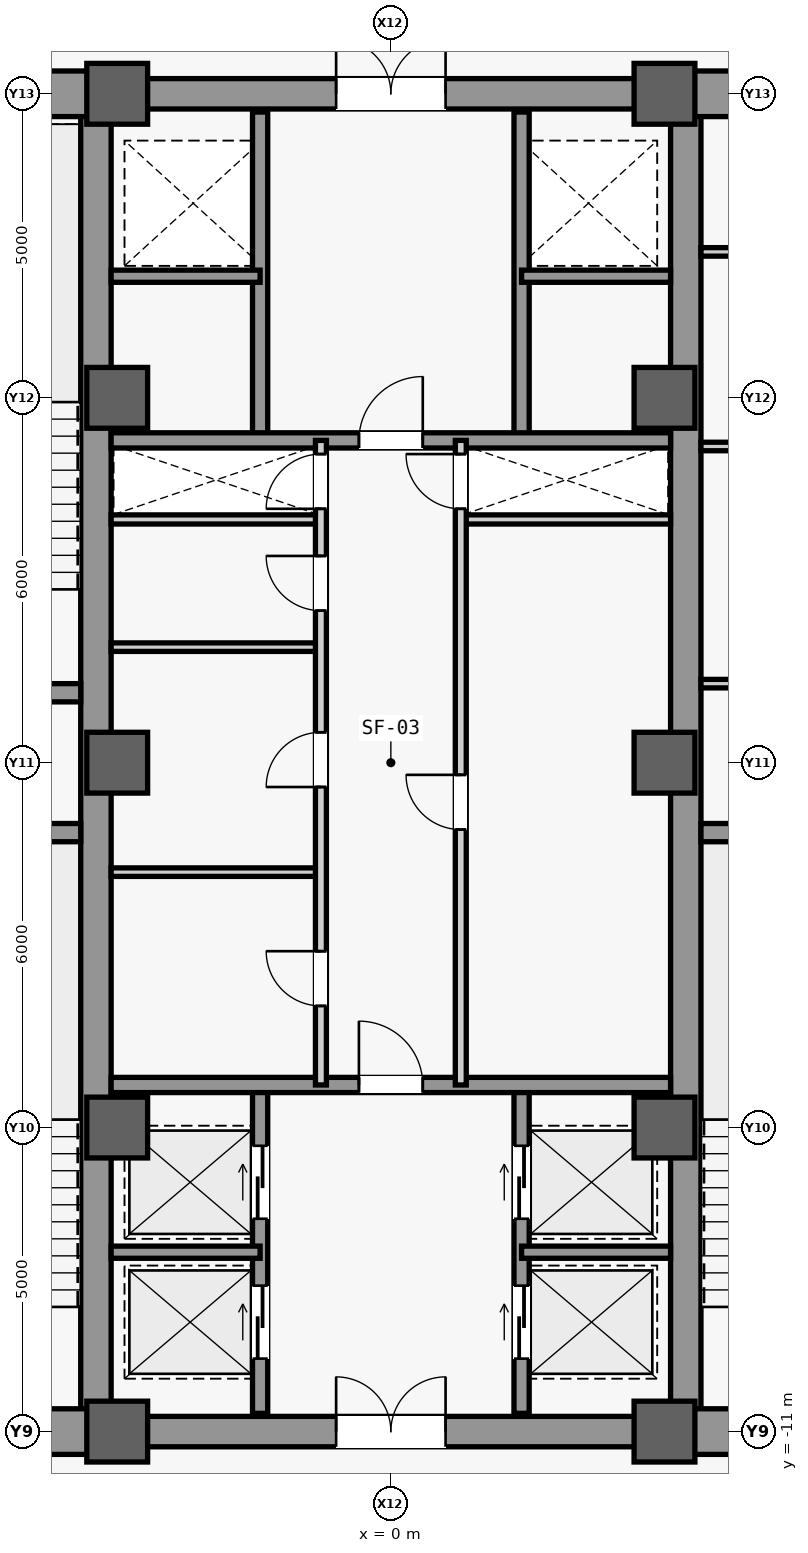
"""IFC4 building model, lengths in metres.
Left out: names, types, materials, properties, quantities, classifications, styles, units other than length and angle.
Written with IfcOpenShell. Run it as: python <this file> out.ifc"""

import sys

from ifc_helpers import new_model, si_unit, direction, frame, frame_2d, origin, origin_2d, place, context, subcontext, project, spatial, rectangle, extrude, source, transform, mapped, element, fill, save


model = new_model("IFC4")
c1 = context("Model", 3, precision=1e-05, world=origin(), true_north=direction((0.0, 1.0)))
c2 = subcontext(c1, "Body", "Model", "MODEL_VIEW")
j1 = project(units=[si_unit("LENGTHUNIT", "METRE"), si_unit("PLANEANGLEUNIT", "RADIAN")], contexts=[c1])
p1 = place(None, origin())
s1 = spatial("IfcSite", under=j1, at=p1, CompositionType="ELEMENT")
p2 = place(p1, origin())
s2 = spatial("IfcBuilding", under=s1, at=p2, CompositionType="ELEMENT")
p3 = place(p2, frame((0.0, 0.0, 128.3)))
s3 = spatial("IfcBuildingStorey", under=s2, at=p3, CompositionType="ELEMENT", Elevation=128.3)
m1 = source(origin(), c2, "Body", "SweptSolid", [
    extrude(rectangle(XDim=21.4, YDim=0.5, at=frame_2d((10.7, 0.0))), origin(), (0.0, 0.0, 1.0), 3.84),
])
for number, where, z_axis, x_axis in (
    (1, (-4.85, -10.7, 0.0), (0.0, 0.0, 1.0), (0.0, 1.0, 0.0)),
    (2, (4.85, -10.7, 0.0), (0.0, 0.0, 1.0), (0.0, 1.0, 0.0)),
):
    element("IfcWall", number, at=place(p3, frame(where, z_axis=z_axis, x_axis=x_axis)), inside=s3, PredefinedType="SHEAR", context=c2, shape_type="MappedRepresentation", body=[
        mapped(m1, transform((0.0, 0.0, 0.0), scale=1.0)),
    ])
m2 = source(origin(), c2, "Body", "SweptSolid", [
    extrude(rectangle(XDim=5.85, YDim=0.75, at=frame_2d((2.925, 0.0))), origin(), (0.0, 0.0, 1.0), 3.84),
])
for number, where, z_axis, x_axis in (
    (3, (-10.7, -11.0, 0.0), (0.0, 0.0, 1.0), (1.0, 0.0, 0.0)),
    (4, (-10.7, 11.0, 0.0), (0.0, 0.0, 1.0), (1.0, 0.0, 0.0)),
    (5, (4.85, -11.0, 0.0), (0.0, 0.0, 1.0), (1.0, 0.0, 0.0)),
):
    element("IfcWall", number, at=place(p3, frame(where, z_axis=z_axis, x_axis=x_axis)), inside=s3, PredefinedType="SHEAR", context=c2, shape_type="MappedRepresentation", body=[
        mapped(m2, transform((0.0, 0.0, 0.0), scale=1.0)),
    ])
p4 = place(p3, frame((4.85, 11.0, 0.0), z_axis=(0.0, 0.0, 1.0), x_axis=(1.0, 0.0, 0.0)))
e6 = element("IfcWall", 6, at=p4, inside=s3, PredefinedType="SHEAR", context=c2, shape_type="MappedRepresentation", body=[
    mapped(m2, transform((0.0, 0.0, 0.0), scale=1.0)),
])
m3 = source(origin(), c2, "Body", "SweptSolid", [
    extrude(rectangle(XDim=1.05, YDim=2.2, at=frame_2d((0.525, 1.1))), frame((0.0, 0.385, 0.0), z_axis=(0.0, -1.0, 0.0), x_axis=(1.0, 0.0, 0.0)), (0.0, 0.0, 1.0), 0.77),
])
p5 = place(p4, frame((1.375, 0.0, 0.0)))
e7 = element("IfcOpeningElement", 7, at=p5, cuts=e6, PredefinedType="OPENING", context=c2, shape_type="MappedRepresentation", body=[
    mapped(m3, transform((0.0, 0.0, 0.0), scale=1.0)),
])
m4 = source(origin(), c2, "Body", "SweptSolid", [
    extrude(rectangle(XDim=5.6, YDim=0.3, at=frame_2d((2.8, 0.0))), origin(), (0.0, 0.0, 1.0), 3.84),
])
for number, where, z_axis, x_axis in (
    (8, (-10.7, -1.15, 0.0), (0.0, 0.0, 1.0), (1.0, 0.0, 0.0)),
    (9, (-10.7, 1.15, 0.0), (0.0, 0.0, 1.0), (1.0, 0.0, 0.0)),
    (10, (5.1, -1.15, 0.0), (0.0, 0.0, 1.0), (1.0, 0.0, 0.0)),
):
    element("IfcWall", number, at=place(p3, frame(where, z_axis=z_axis, x_axis=x_axis)), inside=s3, PredefinedType="SHEAR", context=c2, shape_type="MappedRepresentation", body=[
        mapped(m4, transform((0.0, 0.0, 0.0), scale=1.0)),
    ])
m5 = source(origin(), c2, "Body", "SweptSolid", [
    extrude(rectangle(XDim=9.2, YDim=0.5, at=frame_2d((4.6, 0.0))), origin(), (0.0, 0.0, 1.0), 3.84),
])
p6 = place(p3, frame((-4.6, -11.0, 0.0), z_axis=(0.0, 0.0, 1.0), x_axis=(1.0, 0.0, 0.0)))
e11 = element("IfcWall", 11, at=p6, inside=s3, PredefinedType="SHEAR", context=c2, shape_type="MappedRepresentation", body=[
    mapped(m5, transform((0.0, 0.0, 0.0), scale=1.0)),
])
m6 = source(origin(), c2, "Body", "SweptSolid", [
    extrude(rectangle(XDim=1.8, YDim=2.25, at=frame_2d((0.9, 1.125))), frame((0.0, 0.26, 0.0), z_axis=(0.0, -1.0, 0.0), x_axis=(1.0, 0.0, 0.0)), (0.0, 0.0, 1.0), 0.52),
])
p7 = place(p6, frame((3.7, 0.0, 0.0)))
e12 = element("IfcOpeningElement", 12, at=p7, cuts=e11, PredefinedType="OPENING", context=c2, shape_type="MappedRepresentation", body=[
    mapped(m6, transform((0.0, 0.0, 0.0), scale=1.0)),
])
p8 = place(p3, frame((-4.6, 11.0, 0.0), z_axis=(0.0, 0.0, 1.0), x_axis=(1.0, 0.0, 0.0)))
e13 = element("IfcWall", 13, at=p8, inside=s3, PredefinedType="SHEAR", context=c2, shape_type="MappedRepresentation", body=[
    mapped(m5, transform((0.0, 0.0, 0.0), scale=1.0)),
])
p9 = place(p8, frame((3.7, 0.0, 0.0)))
e14 = element("IfcOpeningElement", 14, at=p9, cuts=e13, PredefinedType="OPENING", context=c2, shape_type="MappedRepresentation", body=[
    mapped(m6, transform((0.0, 0.0, 0.0), scale=1.0)),
])
m7 = source(origin(), c2, "Body", "SweptSolid", [
    extrude(rectangle(XDim=1.0, YDim=1.0, at=origin_2d()), origin(), (0.0, 0.0, 1.0), 4.1),
])
for number, where, z_axis, x_axis in (
    (15, (-4.5, -11.0, 0.0), (0.0, 0.0, 1.0), (1.0, 0.0, 0.0)),
    (16, (-4.5, -6.0, 0.0), (0.0, 0.0, 1.0), (1.0, 0.0, 0.0)),
    (17, (-4.5, 0.0, 0.0), (0.0, 0.0, 1.0), (1.0, 0.0, 0.0)),
    (18, (-4.5, 6.0, 0.0), (0.0, 0.0, 1.0), (1.0, 0.0, 0.0)),
    (19, (-4.5, 11.0, 0.0), (0.0, 0.0, 1.0), (1.0, 0.0, 0.0)),
    (20, (4.5, -11.0, 0.0), (0.0, 0.0, 1.0), (1.0, 0.0, 0.0)),
    (21, (4.5, -6.0, 0.0), (0.0, 0.0, 1.0), (1.0, 0.0, 0.0)),
    (22, (4.5, 0.0, 0.0), (0.0, 0.0, 1.0), (1.0, 0.0, 0.0)),
    (23, (4.5, 6.0, 0.0), (0.0, 0.0, 1.0), (1.0, 0.0, 0.0)),
    (24, (4.5, 11.0, 0.0), (0.0, 0.0, 1.0), (1.0, 0.0, 0.0)),
):
    element("IfcColumn", number, at=place(p3, frame(where, z_axis=z_axis, x_axis=x_axis)), inside=s3, PredefinedType="COLUMN", context=c2, shape_type="MappedRepresentation", body=[
        mapped(m7, transform((0.0, 0.0, 0.0), scale=1.0)),
    ])
m8 = source(origin(), c2, "Body", "SweptSolid", [
    extrude(rectangle(XDim=3.15, YDim=0.14, at=frame_2d((1.575, 0.0))), origin(), (0.0, 0.0, 1.0), 3.84),
])
p10 = place(p3, frame((5.1, 1.3, 0.0), z_axis=(0.0, 0.0, 1.0), x_axis=(1.0, 0.0, 0.0)))
e25 = element("IfcWall", 25, at=p10, inside=s3, PredefinedType="PARTITIONING", context=c2, shape_type="MappedRepresentation", body=[
    mapped(m8, transform((0.0, 0.0, 0.0), scale=1.0)),
])
p11 = place(p3, frame((5.1, 8.4, 0.0), z_axis=(0.0, 0.0, 1.0), x_axis=(1.0, 0.0, 0.0)))
e26 = element("IfcWall", 26, at=p11, inside=s3, PredefinedType="PARTITIONING", context=c2, shape_type="MappedRepresentation", body=[
    mapped(m8, transform((0.0, 0.0, 0.0), scale=1.0)),
])
m9 = source(origin(), c2, "Body", "SweptSolid", [
    extrude(rectangle(XDim=0.9, YDim=2.15, at=frame_2d((0.45, 1.075))), frame((0.0, 0.08, 0.0), z_axis=(0.0, -1.0, 0.0), x_axis=(1.0, 0.0, 0.0)), (0.0, 0.0, 1.0), 0.16),
])
p12 = place(p11, frame((1.13, 0.0, 0.0)))
e27 = element("IfcOpeningElement", 27, at=p12, cuts=e26, PredefinedType="OPENING", context=c2, shape_type="MappedRepresentation", body=[
    mapped(m9, transform((0.0, 0.0, 0.0), scale=1.0)),
])
p13 = place(p3, frame((5.1, 5.2, 0.0), z_axis=(0.0, 0.0, 1.0), x_axis=(1.0, 0.0, 0.0)))
e28 = element("IfcWall", 28, at=p13, inside=s3, PredefinedType="PARTITIONING", context=c2, shape_type="MappedRepresentation", body=[
    mapped(m8, transform((0.0, 0.0, 0.0), scale=1.0)),
])
p14 = place(p13, frame((1.13, 0.0, 0.0)))
e29 = element("IfcOpeningElement", 29, at=p14, cuts=e28, PredefinedType="OPENING", context=c2, shape_type="MappedRepresentation", body=[
    mapped(m9, transform((0.0, 0.0, 0.0), scale=1.0)),
])
m10 = source(origin(), c2, "Body", "SweptSolid", [
    extrude(rectangle(XDim=3.45, YDim=0.15, at=frame_2d((1.725, 0.0))), origin(), (0.0, 0.0, 1.0), 3.84),
])
for number, where, z_axis, x_axis in (
    (30, (-4.6, 4.0, 0.0), (0.0, 0.0, 1.0), (1.0, 0.0, 0.0)),
    (31, (1.15, 4.0, 0.0), (0.0, 0.0, 1.0), (1.0, 0.0, 0.0)),
):
    element("IfcWall", number, at=place(p3, frame(where, z_axis=z_axis, x_axis=x_axis)), inside=s3, PredefinedType="PARTITIONING", context=c2, shape_type="MappedRepresentation", body=[
        mapped(m10, transform((0.0, 0.0, 0.0), scale=1.0)),
    ])
m11 = source(origin(), c2, "Body", "SweptSolid", [
    extrude(rectangle(XDim=5.4, YDim=0.25, at=frame_2d((2.7, 0.0))), origin(), (0.0, 0.0, 1.0), 3.84),
])
p15 = place(p3, frame((-2.15, -10.7, 0.0), z_axis=(0.0, 0.0, 1.0), x_axis=(0.0, 1.0, 0.0)))
e32 = element("IfcWall", 32, at=p15, inside=s3, PredefinedType="SHEAR", context=c2, shape_type="MappedRepresentation", body=[
    mapped(m11, transform((0.0, 0.0, 0.0), scale=1.0)),
])
m12 = source(origin(), c2, "Body", "SweptSolid", [
    extrude(rectangle(XDim=1.2, YDim=2.3, at=frame_2d((0.6, 1.15))), frame((0.0, 0.135, 0.0), z_axis=(0.0, -1.0, 0.0), x_axis=(1.0, 0.0, 0.0)), (0.0, 0.0, 1.0), 0.27),
])
p16 = place(p15, frame((0.9, 0.0, 0.0)))
e33 = element("IfcOpeningElement", 33, at=p16, cuts=e32, PredefinedType="OPENING", context=c2, shape_type="MappedRepresentation", body=[
    mapped(m12, transform((0.0, 0.0, 0.0), scale=1.0)),
])
p17 = place(p15, frame((3.2, 0.0, 0.0)))
e34 = element("IfcOpeningElement", 34, at=p17, cuts=e32, PredefinedType="OPENING", context=c2, shape_type="MappedRepresentation", body=[
    mapped(m12, transform((0.0, 0.0, 0.0), scale=1.0)),
])
p18 = place(p3, frame((2.15, -10.7, 0.0), z_axis=(0.0, 0.0, 1.0), x_axis=(0.0, 1.0, 0.0)))
e35 = element("IfcWall", 35, at=p18, inside=s3, PredefinedType="SHEAR", context=c2, shape_type="MappedRepresentation", body=[
    mapped(m11, transform((0.0, 0.0, 0.0), scale=1.0)),
])
p19 = place(p18, frame((0.9, 0.0, 0.0)))
e36 = element("IfcOpeningElement", 36, at=p19, cuts=e35, PredefinedType="OPENING", context=c2, shape_type="MappedRepresentation", body=[
    mapped(m12, transform((0.0, 0.0, 0.0), scale=1.0)),
])
p20 = place(p18, frame((3.2, 0.0, 0.0)))
e37 = element("IfcOpeningElement", 37, at=p20, cuts=e35, PredefinedType="OPENING", context=c2, shape_type="MappedRepresentation", body=[
    mapped(m12, transform((0.0, 0.0, 0.0), scale=1.0)),
])
m13 = source(origin(), c2, "Body", "SweptSolid", [
    extrude(rectangle(XDim=2.45, YDim=0.2, at=frame_2d((1.225, 0.0))), origin(), (0.0, 0.0, 1.0), 3.84),
])
for number, where, z_axis, x_axis in (
    (38, (-4.6, -8.05, 0.0), (0.0, 0.0, 1.0), (1.0, 0.0, 0.0)),
    (39, (2.15, -8.05, 0.0), (0.0, 0.0, 1.0), (1.0, 0.0, 0.0)),
):
    element("IfcWall", number, at=place(p3, frame(where, z_axis=z_axis, x_axis=x_axis)), inside=s3, PredefinedType="SHEAR", context=c2, shape_type="MappedRepresentation", body=[
        mapped(m13, transform((0.0, 0.0, 0.0), scale=1.0)),
    ])
m14 = source(origin(), c2, "Body", "SweptSolid", [
    extrude(rectangle(XDim=9.2, YDim=0.25, at=frame_2d((4.6, 0.0))), origin(), (0.0, 0.0, 1.0), 3.84),
])
p21 = place(p3, frame((-4.6, -5.3, 0.0), z_axis=(0.0, 0.0, 1.0), x_axis=(1.0, 0.0, 0.0)))
e40 = element("IfcWall", 40, at=p21, inside=s3, PredefinedType="SHEAR", context=c2, shape_type="MappedRepresentation", body=[
    mapped(m14, transform((0.0, 0.0, 0.0), scale=1.0)),
])
m15 = source(origin(), c2, "Body", "SweptSolid", [
    extrude(rectangle(XDim=1.05, YDim=2.2, at=frame_2d((0.525, 1.1))), frame((0.0, 0.135, 0.0), z_axis=(0.0, -1.0, 0.0), x_axis=(1.0, 0.0, 0.0)), (0.0, 0.0, 1.0), 0.27),
])
p22 = place(p21, frame((4.075, 0.0, 0.0)))
e41 = element("IfcOpeningElement", 41, at=p22, cuts=e40, PredefinedType="OPENING", context=c2, shape_type="MappedRepresentation", body=[
    mapped(m15, transform((0.0, 0.0, 0.0), scale=1.0)),
])
for number, where, z_axis, x_axis in (
    (42, (-2.15, 5.3, 0.0), (0.0, 0.0, 1.0), (0.0, 1.0, 0.0)),
    (43, (2.15, 5.3, 0.0), (0.0, 0.0, 1.0), (0.0, 1.0, 0.0)),
):
    element("IfcWall", number, at=place(p3, frame(where, z_axis=z_axis, x_axis=x_axis)), inside=s3, PredefinedType="SHEAR", context=c2, shape_type="MappedRepresentation", body=[
        mapped(m11, transform((0.0, 0.0, 0.0), scale=1.0)),
    ])
for number, where, z_axis, x_axis in (
    (44, (-4.6, 8.0, 0.0), (0.0, 0.0, 1.0), (1.0, 0.0, 0.0)),
    (45, (2.15, 8.0, 0.0), (0.0, 0.0, 1.0), (1.0, 0.0, 0.0)),
):
    element("IfcWall", number, at=place(p3, frame(where, z_axis=z_axis, x_axis=x_axis)), inside=s3, PredefinedType="SHEAR", context=c2, shape_type="MappedRepresentation", body=[
        mapped(m13, transform((0.0, 0.0, 0.0), scale=1.0)),
    ])
p23 = place(p3, frame((-4.6, 5.3, 0.0), z_axis=(0.0, 0.0, 1.0), x_axis=(1.0, 0.0, 0.0)))
e46 = element("IfcWall", 46, at=p23, inside=s3, PredefinedType="SHEAR", context=c2, shape_type="MappedRepresentation", body=[
    mapped(m14, transform((0.0, 0.0, 0.0), scale=1.0)),
])
p24 = place(p23, frame((4.075, 0.0, 0.0)))
e47 = element("IfcOpeningElement", 47, at=p24, cuts=e46, PredefinedType="OPENING", context=c2, shape_type="MappedRepresentation", body=[
    mapped(m15, transform((0.0, 0.0, 0.0), scale=1.0)),
])
m16 = source(origin(), c2, "Body", "SweptSolid", [
    extrude(rectangle(XDim=3.45, YDim=0.14, at=frame_2d((1.725, 0.0))), origin(), (0.0, 0.0, 1.0), 3.84),
])
for number, where, z_axis, x_axis in (
    (48, (-4.6, -1.8, 0.0), (0.0, 0.0, 1.0), (1.0, 0.0, 0.0)),
    (49, (-4.6, 1.9, 0.0), (0.0, 0.0, 1.0), (1.0, 0.0, 0.0)),
):
    element("IfcWall", number, at=place(p3, frame(where, z_axis=z_axis, x_axis=x_axis)), inside=s3, PredefinedType="PARTITIONING", context=c2, shape_type="MappedRepresentation", body=[
        mapped(m16, transform((0.0, 0.0, 0.0), scale=1.0)),
    ])
m17 = source(origin(), c2, "Body", "SweptSolid", [
    extrude(rectangle(XDim=10.6, YDim=0.18, at=frame_2d((5.3, 0.0))), origin(), (0.0, 0.0, 1.0), 3.84),
])
p25 = place(p3, frame((-1.15, -5.3, 0.0), z_axis=(0.0, 0.0, 1.0), x_axis=(0.0, 1.0, 0.0)))
e50 = element("IfcWall", 50, at=p25, inside=s3, PredefinedType="PARTITIONING", context=c2, shape_type="MappedRepresentation", body=[
    mapped(m17, transform((0.0, 0.0, 0.0), scale=1.0)),
])
m18 = source(origin(), c2, "Body", "SweptSolid", [
    extrude(rectangle(XDim=0.9, YDim=2.15, at=frame_2d((0.45, 1.075))), frame((0.0, 0.1, 0.0), z_axis=(0.0, -1.0, 0.0), x_axis=(1.0, 0.0, 0.0)), (0.0, 0.0, 1.0), 0.2),
])
p26 = place(p25, frame((1.3, 0.0, 0.0)))
e51 = element("IfcOpeningElement", 51, at=p26, cuts=e50, PredefinedType="OPENING", context=c2, shape_type="MappedRepresentation", body=[
    mapped(m18, transform((0.0, 0.0, 0.0), scale=1.0)),
])
p27 = place(p25, frame((4.9, 0.0, 0.0)))
e52 = element("IfcOpeningElement", 52, at=p27, cuts=e50, PredefinedType="OPENING", context=c2, shape_type="MappedRepresentation", body=[
    mapped(m18, transform((0.0, 0.0, 0.0), scale=1.0)),
])
p28 = place(p25, frame((7.8, 0.0, 0.0)))
e53 = element("IfcOpeningElement", 53, at=p28, cuts=e50, PredefinedType="OPENING", context=c2, shape_type="MappedRepresentation", body=[
    mapped(m18, transform((0.0, 0.0, 0.0), scale=1.0)),
])
p29 = place(p25, frame((9.475, 0.0, 0.0)))
e54 = element("IfcOpeningElement", 54, at=p29, cuts=e50, PredefinedType="OPENING", context=c2, shape_type="MappedRepresentation", body=[
    mapped(m18, transform((0.0, 0.0, 0.0), scale=1.0)),
])
p30 = place(p3, frame((1.15, -5.3, 0.0), z_axis=(0.0, 0.0, 1.0), x_axis=(0.0, 1.0, 0.0)))
e55 = element("IfcWall", 55, at=p30, inside=s3, PredefinedType="PARTITIONING", context=c2, shape_type="MappedRepresentation", body=[
    mapped(m17, transform((0.0, 0.0, 0.0), scale=1.0)),
])
p31 = place(p30, frame((4.2, 0.0, 0.0)))
e56 = element("IfcOpeningElement", 56, at=p31, cuts=e55, PredefinedType="OPENING", context=c2, shape_type="MappedRepresentation", body=[
    mapped(m18, transform((0.0, 0.0, 0.0), scale=1.0)),
])
p32 = place(p30, frame((9.475, 0.0, 0.0)))
e57 = element("IfcOpeningElement", 57, at=p32, cuts=e55, PredefinedType="OPENING", context=c2, shape_type="MappedRepresentation", body=[
    mapped(m18, transform((0.0, 0.0, 0.0), scale=1.0)),
])
m19 = source(origin(), c2, "Body", "SweptSolid", [
    extrude(rectangle(XDim=1.05, YDim=2.2, at=frame_2d((0.525, 1.1))), frame((0.0, 0.025, 0.0), z_axis=(0.0, -1.0, 0.0), x_axis=(1.0, 0.0, 0.0)), (0.0, 0.0, 1.0), 0.05),
])
p33 = place(p22, origin())
e58 = element("IfcDoor", 58, at=p33, inside=s3, OperationType="SINGLE_SWING_LEFT", PredefinedType="DOOR", context=c2, shape_type="MappedRepresentation", body=[
    mapped(m19, transform((0.0, 0.0, 0.0), scale=1.0)),
])
fill(e41, e58)
m20 = source(origin(), c2, "Body", "SweptSolid", [
    extrude(rectangle(XDim=1.8, YDim=2.25, at=frame_2d((0.9, 1.125))), frame((0.0, 0.025, 0.0), z_axis=(0.0, -1.0, 0.0), x_axis=(1.0, 0.0, 0.0)), (0.0, 0.0, 1.0), 0.05),
])
p34 = place(p7, origin())
e59 = element("IfcDoor", 59, at=p34, inside=s3, OperationType="SINGLE_SWING_LEFT", PredefinedType="DOOR", context=c2, shape_type="MappedRepresentation", body=[
    mapped(m20, transform((0.0, 0.0, 0.0), scale=1.0)),
])
fill(e12, e59)
p35 = place(p24, origin())
e60 = element("IfcDoor", 60, at=p35, inside=s3, OperationType="SINGLE_SWING_RIGHT", PredefinedType="DOOR", context=c2, shape_type="MappedRepresentation", body=[
    mapped(m19, transform((0.0, 0.0, 0.0), scale=1.0)),
])
fill(e47, e60)
p36 = place(p9, origin())
e61 = element("IfcDoor", 61, at=p36, inside=s3, OperationType="SINGLE_SWING_RIGHT", PredefinedType="DOOR", context=c2, shape_type="MappedRepresentation", body=[
    mapped(m20, transform((0.0, 0.0, 0.0), scale=1.0)),
])
fill(e14, e61)
m21 = source(origin(), c2, "Body", "SweptSolid", [
    extrude(rectangle(XDim=0.9, YDim=2.15, at=frame_2d((0.45, 1.075))), frame((0.0, 0.025, 0.0), z_axis=(0.0, -1.0, 0.0), x_axis=(1.0, 0.0, 0.0)), (0.0, 0.0, 1.0), 0.05),
])
p37 = place(p26, origin())
e62 = element("IfcDoor", 62, at=p37, inside=s3, OperationType="SINGLE_SWING_RIGHT", PredefinedType="DOOR", context=c2, shape_type="MappedRepresentation", body=[
    mapped(m21, transform((0.0, 0.0, 0.0), scale=1.0)),
])
fill(e51, e62)
p38 = place(p27, origin())
e63 = element("IfcDoor", 63, at=p38, inside=s3, OperationType="SINGLE_SWING_LEFT", PredefinedType="DOOR", context=c2, shape_type="MappedRepresentation", body=[
    mapped(m21, transform((0.0, 0.0, 0.0), scale=1.0)),
])
fill(e52, e63)
p39 = place(p28, origin())
e64 = element("IfcDoor", 64, at=p39, inside=s3, OperationType="SINGLE_SWING_RIGHT", PredefinedType="DOOR", context=c2, shape_type="MappedRepresentation", body=[
    mapped(m21, transform((0.0, 0.0, 0.0), scale=1.0)),
])
fill(e53, e64)
p40 = place(p31, origin())
e65 = element("IfcDoor", 65, at=p40, inside=s3, OperationType="SINGLE_SWING_RIGHT", PredefinedType="DOOR", context=c2, shape_type="MappedRepresentation", body=[
    mapped(m21, transform((0.0, 0.0, 0.0), scale=1.0)),
])
fill(e56, e65)
p41 = place(p29, origin())
e66 = element("IfcDoor", 66, at=p41, inside=s3, OperationType="SINGLE_SWING_LEFT", PredefinedType="DOOR", context=c2, shape_type="MappedRepresentation", body=[
    mapped(m21, transform((0.0, 0.0, 0.0), scale=1.0)),
])
fill(e54, e66)
p42 = place(p32, origin())
e67 = element("IfcDoor", 67, at=p42, inside=s3, OperationType="SINGLE_SWING_RIGHT", PredefinedType="DOOR", context=c2, shape_type="MappedRepresentation", body=[
    mapped(m21, transform((0.0, 0.0, 0.0), scale=1.0)),
])
fill(e57, e67)
m22 = source(origin(), c2, "Body", "SweptSolid", [
    extrude(rectangle(XDim=1.2, YDim=2.3, at=frame_2d((0.6, 1.15))), frame((0.0, 0.025, 0.0), z_axis=(0.0, -1.0, 0.0), x_axis=(1.0, 0.0, 0.0)), (0.0, 0.0, 1.0), 0.05),
])
p43 = place(p16, origin())
e68 = element("IfcDoor", 68, at=p43, inside=s3, OperationType="SLIDING_TO_LEFT", PredefinedType="DOOR", context=c2, shape_type="MappedRepresentation", body=[
    mapped(m22, transform((0.0, 0.0, 0.0), scale=1.0)),
])
fill(e33, e68)
p44 = place(p19, origin())
e69 = element("IfcDoor", 69, at=p44, inside=s3, OperationType="SLIDING_TO_LEFT", PredefinedType="DOOR", context=c2, shape_type="MappedRepresentation", body=[
    mapped(m22, transform((0.0, 0.0, 0.0), scale=1.0)),
])
fill(e36, e69)
p45 = place(p17, origin())
e70 = element("IfcDoor", 70, at=p45, inside=s3, OperationType="SLIDING_TO_LEFT", PredefinedType="DOOR", context=c2, shape_type="MappedRepresentation", body=[
    mapped(m22, transform((0.0, 0.0, 0.0), scale=1.0)),
])
fill(e34, e70)
p46 = place(p20, origin())
e71 = element("IfcDoor", 71, at=p46, inside=s3, OperationType="SLIDING_TO_LEFT", PredefinedType="DOOR", context=c2, shape_type="MappedRepresentation", body=[
    mapped(m22, transform((0.0, 0.0, 0.0), scale=1.0)),
])
fill(e37, e71)
save(model, sys.argv[1])
